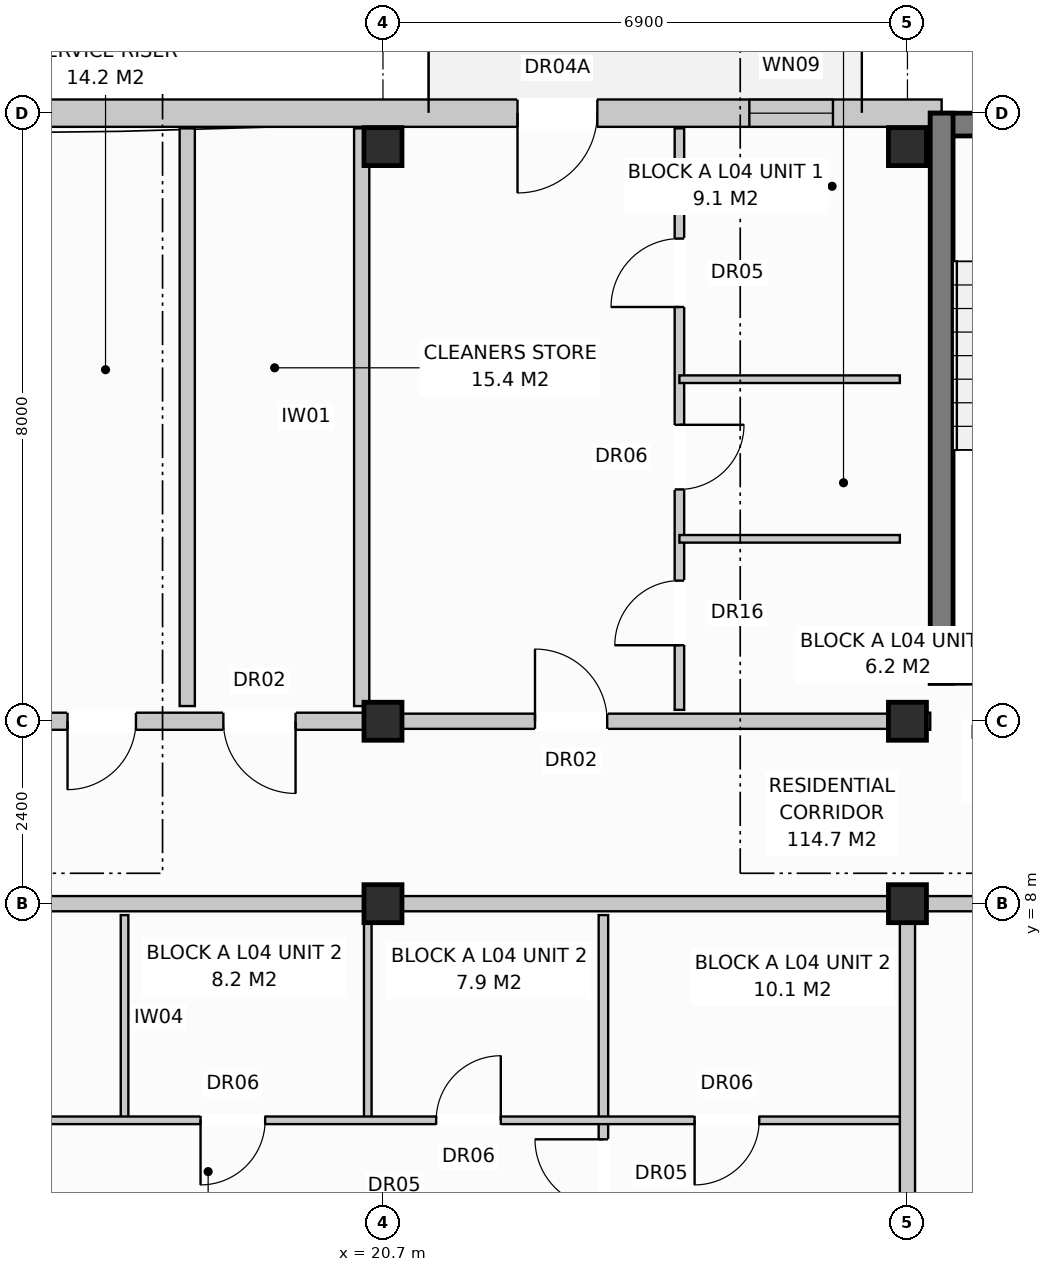
"""IFC4 building model, lengths in metres.
Left out: names, types, materials, properties, quantities, classifications, styles, units other than length and angle.
Written with IfcOpenShell. Run it as: python <this file> out.ifc"""

import sys

from ifc_helpers import new_model, si_unit, direction, frame, frame_2d, origin, origin_with_axes, origin_2d, place, context, subcontext, project, spatial, rectangle, extrude, element, fill, save


model = new_model("IFC4")
c1 = context("Model", 3, precision=1e-05, world=origin(), true_north=direction((0.0, 1.0)))
c2 = subcontext(c1, "Body", "Model", "MODEL_VIEW")
j1 = project(units=[si_unit("LENGTHUNIT", "METRE"), si_unit("PLANEANGLEUNIT", "RADIAN")], contexts=[c1])
p1 = place(None, origin())
s1 = spatial("IfcSite", under=j1, at=p1, CompositionType="ELEMENT")
p2 = place(p1, origin())
s2 = spatial("IfcBuilding", under=s1, at=p2, CompositionType="ELEMENT")
p3 = place(p2, frame((0.0, 0.0, 14.4)))
s3 = spatial("IfcBuildingStorey", under=s2, at=p3, CompositionType="ELEMENT", Elevation=14.4)
for number, where, z_axis, x_axis in (
    (1, (20.7, 8.0, 0.0), (0.0, 0.0, 1.0), (1.0, 0.0, 0.0)),
    (2, (20.7, 10.4, 0.0), (0.0, 0.0, 1.0), (1.0, 0.0, 0.0)),
    (3, (20.7, 17.96, 0.0), (0.0, 0.0, 1.0), (1.0, 0.0, 0.0)),
    (4, (27.6, 8.0, 0.0), (0.0, 0.0, 1.0), (1.0, 0.0, 0.0)),
    (5, (27.6, 10.4, 0.0), (0.0, 0.0, 1.0), (1.0, 0.0, 0.0)),
    (6, (27.6, 17.96, 0.0), (0.0, 0.0, 1.0), (1.0, 0.0, 0.0)),
):
    element("IfcColumn", number, at=place(p3, frame(where, z_axis=z_axis, x_axis=x_axis)), inside=s3, PredefinedType="COLUMN", context=c2, shape_type="SweptSolid", body=[
        extrude(rectangle(XDim=0.5, YDim=0.5, at=origin_2d()), origin(), (0.0, 0.0, 1.0), 3.2),
    ])
p4 = place(p3, frame((10.65, 18.4, 0.0), z_axis=(0.0, 0.0, 1.0), x_axis=(1.0, 0.0, 0.0)))
e7 = element("IfcWall", 7, at=p4, inside=s3, PredefinedType="STANDARD", context=c2, shape_type="SweptSolid", body=[
    extrude(rectangle(XDim=17.4, YDim=0.36, at=frame_2d((8.7, 0.0))), origin(), (0.0, 0.0, 1.0), 2.94),
])
p5 = place(p4, frame((11.82, 0.0, 0.0)))
e8 = element("IfcOpeningElement", 8, at=p5, cuts=e7, PredefinedType="OPENING", context=c2, shape_type="SweptSolid", body=[
    extrude(rectangle(XDim=1.05, YDim=2.12, at=frame_2d((0.525, 1.06))), frame((0.0, 0.192, 0.0), z_axis=(0.0, -1.0, 0.0), x_axis=(1.0, 0.0, 0.0)), (0.0, 0.0, 1.0), 0.384),
])
p6 = place(p4, frame((14.87, 0.0, 0.72)))
e9 = element("IfcOpeningElement", 9, at=p6, cuts=e7, PredefinedType="OPENING", context=c2, shape_type="SweptSolid", body=[
    extrude(rectangle(XDim=1.1, YDim=1.5, at=frame_2d((0.55, 0.75))), frame((0.0, 0.192, 0.0), z_axis=(0.0, -1.0, 0.0), x_axis=(1.0, 0.0, 0.0)), (0.0, 0.0, 1.0), 0.384),
])
for number, where, z_axis, x_axis in (
    (10, (18.125, 10.6, 0.0), (0.0, 0.0, 1.0), (0.0, 1.0, 0.0)),
    (11, (20.42, 10.6, 0.0), (0.0, 0.0, 1.0), (0.0, 1.0, 0.0)),
):
    element("IfcWall", number, at=place(p3, frame(where, z_axis=z_axis, x_axis=x_axis)), inside=s3, PredefinedType="PARTITIONING", context=c2, shape_type="SweptSolid", body=[
        extrude(rectangle(XDim=7.6, YDim=0.2, at=frame_2d((3.8, 0.0))), origin(), (0.0, 0.0, 1.0), 2.94),
    ])
p7 = place(p3, frame((10.8, 10.4, 0.0), z_axis=(0.0, 0.0, 1.0), x_axis=(1.0, 0.0, 0.0)))
e12 = element("IfcWall", 12, at=p7, inside=s3, PredefinedType="PARTITIONING", context=c2, shape_type="SweptSolid", body=[
    extrude(rectangle(XDim=9.9, YDim=0.225, at=frame_2d((4.95, 0.0))), origin(), (0.0, 0.0, 1.0), 2.38),
])
p8 = place(p7, frame((0.475, 0.0, 0.0)))
e13 = element("IfcOpeningElement", 13, at=p8, cuts=e12, PredefinedType="OPENING", context=c2, shape_type="SweptSolid", body=[
    extrude(rectangle(XDim=1.1, YDim=2.15, at=frame_2d((0.55, 1.075))), frame((0.0, 0.125, 0.0), z_axis=(0.0, -1.0, 0.0), x_axis=(1.0, 0.0, 0.0)), (0.0, 0.0, 1.0), 0.249),
])
p9 = place(p7, frame((5.75, 0.0, 0.0)))
e14 = element("IfcOpeningElement", 14, at=p9, cuts=e12, PredefinedType="OPENING", context=c2, shape_type="SweptSolid", body=[
    extrude(rectangle(XDim=0.9, YDim=2.1, at=frame_2d((0.45, 1.05))), frame((0.0, 0.125, 0.0), z_axis=(0.0, -1.0, 0.0), x_axis=(1.0, 0.0, 0.0)), (0.0, 0.0, 1.0), 0.249),
])
p10 = place(p7, frame((7.8, 0.0, 0.0)))
e15 = element("IfcOpeningElement", 15, at=p10, cuts=e12, PredefinedType="OPENING", context=c2, shape_type="SweptSolid", body=[
    extrude(rectangle(XDim=0.95, YDim=2.15, at=frame_2d((0.475, 1.075))), frame((0.0, 0.125, 0.0), z_axis=(0.0, -1.0, 0.0), x_axis=(1.0, 0.0, 0.0)), (0.0, 0.0, 1.0), 0.249),
])
for number, where, z_axis, x_axis in (
    (16, (27.9, 18.25, 0.0), (0.0, 0.0, 1.0), (1.0, 0.0, 0.0)),
    (17, (27.9, 11.05, 0.0), (0.0, 0.0, 1.0), (1.0, 0.0, 0.0)),
):
    element("IfcWall", number, at=place(p3, frame(where, z_axis=z_axis, x_axis=x_axis)), inside=s3, PredefinedType="SHEAR", context=c2, shape_type="SweptSolid", body=[
        extrude(rectangle(XDim=3.6, YDim=0.3, at=frame_2d((1.8, 0.0))), origin(), (0.0, 0.0, 1.0), 2.94),
    ])
p11 = place(p3, frame((28.05, 10.9, 0.0), z_axis=(0.0, 0.0, 1.0), x_axis=(0.0, 1.0, 0.0)))
e18 = element("IfcWall", 18, at=p11, inside=s3, PredefinedType="SHEAR", context=c2, shape_type="SweptSolid", body=[
    extrude(rectangle(XDim=7.5, YDim=0.3, at=frame_2d((3.75, 0.0))), origin(), (0.0, 0.0, 1.0), 2.94),
])
p12 = place(p3, frame((27.6, 10.4, 0.0), z_axis=(0.0, 0.0, 1.0), x_axis=(1.0, 0.0, 0.0)))
e19 = element("IfcWall", 19, at=p12, inside=s3, PredefinedType="PARTITIONING", context=c2, shape_type="SweptSolid", body=[
    extrude(rectangle(XDim=0.3, YDim=0.225, at=frame_2d((0.15, 0.0))), origin(), (0.0, 0.0, 1.0), 2.94),
])
p13 = place(p3, frame((27.6, 7.85, 0.0), z_axis=(0.0, 0.0, 1.0), x_axis=(0.0, -1.0, 0.0)))
e20 = element("IfcWall", 20, at=p13, inside=s3, PredefinedType="PARTITIONING", context=c2, shape_type="SweptSolid", body=[
    extrude(rectangle(XDim=7.7, YDim=0.2, at=frame_2d((3.85, 0.0))), origin(), (0.0, 0.0, 1.0), 2.94),
])
p14 = place(p3, frame((6.9, 8.0, 0.0), z_axis=(0.0, 0.0, 1.0), x_axis=(1.0, 0.0, 0.0)))
e21 = element("IfcWall", 21, at=p14, inside=s3, PredefinedType="PARTITIONING", context=c2, shape_type="SweptSolid", body=[
    extrude(rectangle(XDim=20.7, YDim=0.2, at=frame_2d((10.35, 0.0))), origin(), (0.0, 0.0, 1.0), 2.38),
])
p15 = place(p14, frame((2.4, 0.0, 0.0)))
e22 = element("IfcOpeningElement", 22, at=p15, cuts=e21, PredefinedType="OPENING", context=c2, shape_type="SweptSolid", body=[
    extrude(rectangle(XDim=0.95, YDim=2.15, at=frame_2d((0.475, 1.075))), frame((0.0, 0.112, 0.0), z_axis=(0.0, -1.0, 0.0), x_axis=(1.0, 0.0, 0.0)), (0.0, 0.0, 1.0), 0.224),
])
for number, where, z_axis, x_axis in (
    (23, (17.3, 7.85, 0.0), (0.0, 0.0, 1.0), (0.0, -1.0, 0.0)),
    (24, (20.5, 7.85, 0.0), (0.0, 0.0, 1.0), (0.0, -1.0, 0.0)),
):
    element("IfcWall", number, at=place(p3, frame(where, z_axis=z_axis, x_axis=x_axis)), inside=s3, PredefinedType="PARTITIONING", context=c2, shape_type="SweptSolid", body=[
        extrude(rectangle(XDim=2.7, YDim=0.1, at=frame_2d((1.35, 0.0))), origin(), (0.0, 0.0, 1.0), 2.94),
    ])
p16 = place(p3, frame((23.6, 7.85, 0.0), z_axis=(0.0, 0.0, 1.0), x_axis=(0.0, -1.0, 0.0)))
e25 = element("IfcWall", 25, at=p16, inside=s3, PredefinedType="PARTITIONING", context=c2, shape_type="SweptSolid", body=[
    extrude(rectangle(XDim=7.65, YDim=0.125, at=frame_2d((3.825, 0.0))), origin(), (0.0, 0.0, 1.0), 2.94),
])
p17 = place(p16, frame((2.95, 0.0, 0.0)))
e26 = element("IfcOpeningElement", 26, at=p17, cuts=e25, PredefinedType="OPENING", context=c2, shape_type="SweptSolid", body=[
    extrude(rectangle(XDim=0.9, YDim=2.1, at=frame_2d((0.45, 1.05))), frame((0.0, 0.074, 0.0), z_axis=(0.0, -1.0, 0.0), x_axis=(1.0, 0.0, 0.0)), (0.0, 0.0, 1.0), 0.149),
])
p18 = place(p3, frame((13.2, 5.15, 0.0), z_axis=(0.0, 0.0, 1.0), x_axis=(1.0, 0.0, 0.0)))
e27 = element("IfcWall", 27, at=p18, inside=s3, PredefinedType="PARTITIONING", context=c2, shape_type="SweptSolid", body=[
    extrude(rectangle(XDim=14.3, YDim=0.1, at=frame_2d((7.15, 0.0))), origin(), (0.0, 0.0, 1.0), 2.94),
])
p19 = place(p18, frame((1.6, 0.0, 0.0)))
e28 = element("IfcOpeningElement", 28, at=p19, cuts=e27, PredefinedType="OPENING", context=c2, shape_type="SweptSolid", body=[
    extrude(rectangle(XDim=0.9, YDim=2.1, at=frame_2d((0.45, 1.05))), frame((0.0, 0.062, 0.0), z_axis=(0.0, -1.0, 0.0), x_axis=(1.0, 0.0, 0.0)), (0.0, 0.0, 1.0), 0.124),
])
p20 = place(p18, frame((5.1, 0.0, 0.0)))
e29 = element("IfcOpeningElement", 29, at=p20, cuts=e27, PredefinedType="OPENING", context=c2, shape_type="SweptSolid", body=[
    extrude(rectangle(XDim=0.85, YDim=2.05, at=frame_2d((0.425, 1.025))), frame((0.0, 0.062, 0.0), z_axis=(0.0, -1.0, 0.0), x_axis=(1.0, 0.0, 0.0)), (0.0, 0.0, 1.0), 0.124),
])
p21 = place(p18, frame((8.2, 0.0, 0.0)))
e30 = element("IfcOpeningElement", 30, at=p21, cuts=e27, PredefinedType="OPENING", context=c2, shape_type="SweptSolid", body=[
    extrude(rectangle(XDim=0.85, YDim=2.05, at=frame_2d((0.425, 1.025))), frame((0.0, 0.062, 0.0), z_axis=(0.0, -1.0, 0.0), x_axis=(1.0, 0.0, 0.0)), (0.0, 0.0, 1.0), 0.124),
])
p22 = place(p18, frame((11.6, 0.0, 0.0)))
e31 = element("IfcOpeningElement", 31, at=p22, cuts=e27, PredefinedType="OPENING", context=c2, shape_type="SweptSolid", body=[
    extrude(rectangle(XDim=0.85, YDim=2.05, at=frame_2d((0.425, 1.025))), frame((0.0, 0.062, 0.0), z_axis=(0.0, -1.0, 0.0), x_axis=(1.0, 0.0, 0.0)), (0.0, 0.0, 1.0), 0.124),
])
p23 = place(p3, frame((27.6, 8.0, 0.0), z_axis=(0.0, 0.0, 1.0), x_axis=(1.0, 0.0, 0.0)))
e32 = element("IfcWall", 32, at=p23, inside=s3, PredefinedType="PARTITIONING", context=c2, shape_type="SweptSolid", body=[
    extrude(rectangle(XDim=6.9, YDim=0.2, at=frame_2d((3.45, 0.0))), origin(), (0.0, 0.0, 1.0), 2.38),
])
p24 = place(p23, frame((2.0, 0.0, 0.0)))
e33 = element("IfcOpeningElement", 33, at=p24, cuts=e32, PredefinedType="OPENING", context=c2, shape_type="SweptSolid", body=[
    extrude(rectangle(XDim=0.95, YDim=2.15, at=frame_2d((0.475, 1.075))), frame((0.0, 0.112, 0.0), z_axis=(0.0, -1.0, 0.0), x_axis=(1.0, 0.0, 0.0)), (0.0, 0.0, 1.0), 0.224),
])
p25 = place(p3, frame((20.7, 10.4, 0.0), z_axis=(0.0, 0.0, 1.0), x_axis=(1.0, 0.0, 0.0)))
e34 = element("IfcWall", 34, at=p25, inside=s3, PredefinedType="PARTITIONING", context=c2, shape_type="SweptSolid", body=[
    extrude(rectangle(XDim=6.9, YDim=0.2, at=frame_2d((3.45, 0.0))), origin(), (0.0, 0.0, 1.0), 2.38),
])
p26 = place(p25, frame((2.0, 0.0, 0.0)))
e35 = element("IfcOpeningElement", 35, at=p26, cuts=e34, PredefinedType="OPENING", context=c2, shape_type="SweptSolid", body=[
    extrude(rectangle(XDim=0.95, YDim=2.15, at=frame_2d((0.475, 1.075))), frame((0.0, 0.112, 0.0), z_axis=(0.0, -1.0, 0.0), x_axis=(1.0, 0.0, 0.0)), (0.0, 0.0, 1.0), 0.224),
])
p27 = place(p3, frame((24.6, 10.55, 0.0), z_axis=(0.0, 0.0, 1.0), x_axis=(0.0, 1.0, 0.0)))
e36 = element("IfcWall", 36, at=p27, inside=s3, PredefinedType="PARTITIONING", context=c2, shape_type="SweptSolid", body=[
    extrude(rectangle(XDim=7.65, YDim=0.125, at=frame_2d((3.825, 0.0))), origin(), (0.0, 0.0, 1.0), 2.94),
])
p28 = place(p27, frame((0.85, 0.0, 0.0)))
e37 = element("IfcOpeningElement", 37, at=p28, cuts=e36, PredefinedType="OPENING", context=c2, shape_type="SweptSolid", body=[
    extrude(rectangle(XDim=0.85, YDim=2.1, at=frame_2d((0.425, 1.05))), frame((0.0, 0.074, 0.0), z_axis=(0.0, -1.0, 0.0), x_axis=(1.0, 0.0, 0.0)), (0.0, 0.0, 1.0), 0.149),
])
p29 = place(p27, frame((2.9, 0.0, 0.0)))
e38 = element("IfcOpeningElement", 38, at=p29, cuts=e36, PredefinedType="OPENING", context=c2, shape_type="SweptSolid", body=[
    extrude(rectangle(XDim=0.85, YDim=2.05, at=frame_2d((0.425, 1.025))), frame((0.0, 0.074, 0.0), z_axis=(0.0, -1.0, 0.0), x_axis=(1.0, 0.0, 0.0)), (0.0, 0.0, 1.0), 0.149),
])
p30 = place(p27, frame((5.3, 0.0, 0.0)))
e39 = element("IfcOpeningElement", 39, at=p30, cuts=e36, PredefinedType="OPENING", context=c2, shape_type="SweptSolid", body=[
    extrude(rectangle(XDim=0.9, YDim=2.1, at=frame_2d((0.45, 1.05))), frame((0.0, 0.074, 0.0), z_axis=(0.0, -1.0, 0.0), x_axis=(1.0, 0.0, 0.0)), (0.0, 0.0, 1.0), 0.149),
])
for number, where, z_axis, x_axis in (
    (40, (24.6, 12.8, 0.0), (0.0, 0.0, 1.0), (1.0, 0.0, 0.0)),
    (41, (24.6, 14.9, 0.0), (0.0, 0.0, 1.0), (1.0, 0.0, 0.0)),
):
    element("IfcWall", number, at=place(p3, frame(where, z_axis=z_axis, x_axis=x_axis)), inside=s3, PredefinedType="PARTITIONING", context=c2, shape_type="SweptSolid", body=[
        extrude(rectangle(XDim=2.9, YDim=0.1, at=frame_2d((1.45, 0.0))), origin(), (0.0, 0.0, 1.0), 2.94),
    ])
p31 = place(p5, frame((1.05, 0.0, 0.0), z_axis=(0.0, 0.0, 1.0), x_axis=(-1.0, 0.0, 0.0)))
e42 = element("IfcDoor", 42, at=p31, inside=s3, OperationType="SINGLE_SWING_LEFT", PredefinedType="DOOR", context=c2, shape_type="SweptSolid", body=[
    extrude(rectangle(XDim=1.05, YDim=2.12, at=frame_2d((0.525, 1.06))), frame((0.0, 0.025, 0.0), z_axis=(0.0, -1.0, 0.0), x_axis=(1.0, 0.0, 0.0)), (0.0, 0.0, 1.0), 0.05),
])
fill(e8, e42)
p32 = place(p6, origin_with_axes())
e43 = element("IfcWindow", 43, at=p32, inside=s3, PartitioningType="SINGLE_PANEL", PredefinedType="WINDOW", context=c2, shape_type="SweptSolid", body=[
    extrude(rectangle(XDim=1.1, YDim=1.5, at=frame_2d((0.55, 0.75))), frame((0.0, 0.03, 0.0), z_axis=(0.0, -1.0, 0.0), x_axis=(1.0, 0.0, 0.0)), (0.0, 0.0, 1.0), 0.06),
])
fill(e9, e43)
p33 = place(p9, frame((0.9, 0.0, 0.0), z_axis=(0.0, 0.0, 1.0), x_axis=(-1.0, 0.0, 0.0)))
e44 = element("IfcDoor", 44, at=p33, inside=s3, OperationType="SINGLE_SWING_LEFT", PredefinedType="DOOR", context=c2, shape_type="SweptSolid", body=[
    extrude(rectangle(XDim=0.9, YDim=2.1, at=frame_2d((0.45, 1.05))), frame((0.0, 0.025, 0.0), z_axis=(0.0, -1.0, 0.0), x_axis=(1.0, 0.0, 0.0)), (0.0, 0.0, 1.0), 0.05),
])
fill(e14, e44)
p34 = place(p10, frame((0.95, 0.0, 0.0), z_axis=(0.0, 0.0, 1.0), x_axis=(-1.0, 0.0, 0.0)))
e45 = element("IfcDoor", 45, at=p34, inside=s3, OperationType="SINGLE_SWING_RIGHT", PredefinedType="DOOR", context=c2, shape_type="SweptSolid", body=[
    extrude(rectangle(XDim=0.95, YDim=2.15, at=frame_2d((0.475, 1.075))), frame((0.0, 0.025, 0.0), z_axis=(0.0, -1.0, 0.0), x_axis=(1.0, 0.0, 0.0)), (0.0, 0.0, 1.0), 0.05),
])
fill(e15, e45)
p35 = place(p17, frame((0.9, 0.0, 0.0), z_axis=(0.0, 0.0, 1.0), x_axis=(-1.0, 0.0, 0.0)))
e46 = element("IfcDoor", 46, at=p35, inside=s3, OperationType="SINGLE_SWING_LEFT", PredefinedType="DOOR", context=c2, shape_type="SweptSolid", body=[
    extrude(rectangle(XDim=0.9, YDim=2.1, at=frame_2d((0.45, 1.05))), frame((0.0, 0.025, 0.0), z_axis=(0.0, -1.0, 0.0), x_axis=(1.0, 0.0, 0.0)), (0.0, 0.0, 1.0), 0.05),
])
fill(e26, e46)
p36 = place(p20, frame((0.85, 0.0, 0.0), z_axis=(0.0, 0.0, 1.0), x_axis=(-1.0, 0.0, 0.0)))
e47 = element("IfcDoor", 47, at=p36, inside=s3, OperationType="SINGLE_SWING_LEFT", PredefinedType="DOOR", context=c2, shape_type="SweptSolid", body=[
    extrude(rectangle(XDim=0.85, YDim=2.05, at=frame_2d((0.425, 1.025))), frame((0.0, 0.025, 0.0), z_axis=(0.0, -1.0, 0.0), x_axis=(1.0, 0.0, 0.0)), (0.0, 0.0, 1.0), 0.05),
])
fill(e29, e47)
p37 = place(p21, origin_with_axes())
e48 = element("IfcDoor", 48, at=p37, inside=s3, OperationType="SINGLE_SWING_RIGHT", PredefinedType="DOOR", context=c2, shape_type="SweptSolid", body=[
    extrude(rectangle(XDim=0.85, YDim=2.05, at=frame_2d((0.425, 1.025))), frame((0.0, 0.025, 0.0), z_axis=(0.0, -1.0, 0.0), x_axis=(1.0, 0.0, 0.0)), (0.0, 0.0, 1.0), 0.05),
])
fill(e30, e48)
p38 = place(p22, frame((0.85, 0.0, 0.0), z_axis=(0.0, 0.0, 1.0), x_axis=(-1.0, 0.0, 0.0)))
e49 = element("IfcDoor", 49, at=p38, inside=s3, OperationType="SINGLE_SWING_LEFT", PredefinedType="DOOR", context=c2, shape_type="SweptSolid", body=[
    extrude(rectangle(XDim=0.85, YDim=2.05, at=frame_2d((0.425, 1.025))), frame((0.0, 0.025, 0.0), z_axis=(0.0, -1.0, 0.0), x_axis=(1.0, 0.0, 0.0)), (0.0, 0.0, 1.0), 0.05),
])
fill(e31, e49)
p39 = place(p26, origin_with_axes())
e50 = element("IfcDoor", 50, at=p39, inside=s3, OperationType="SINGLE_SWING_LEFT", PredefinedType="DOOR", context=c2, shape_type="SweptSolid", body=[
    extrude(rectangle(XDim=0.95, YDim=2.15, at=frame_2d((0.475, 1.075))), frame((0.0, 0.025, 0.0), z_axis=(0.0, -1.0, 0.0), x_axis=(1.0, 0.0, 0.0)), (0.0, 0.0, 1.0), 0.05),
])
fill(e35, e50)
p40 = place(p28, origin_with_axes())
e51 = element("IfcDoor", 51, at=p40, inside=s3, OperationType="SINGLE_SWING_LEFT", PredefinedType="DOOR", context=c2, shape_type="SweptSolid", body=[
    extrude(rectangle(XDim=0.85, YDim=2.1, at=frame_2d((0.425, 1.05))), frame((0.0, 0.025, 0.0), z_axis=(0.0, -1.0, 0.0), x_axis=(1.0, 0.0, 0.0)), (0.0, 0.0, 1.0), 0.05),
])
fill(e37, e51)
p41 = place(p29, frame((0.85, 0.0, 0.0), z_axis=(0.0, 0.0, 1.0), x_axis=(-1.0, 0.0, 0.0)))
e52 = element("IfcDoor", 52, at=p41, inside=s3, OperationType="SINGLE_SWING_RIGHT", PredefinedType="DOOR", context=c2, shape_type="SweptSolid", body=[
    extrude(rectangle(XDim=0.85, YDim=2.05, at=frame_2d((0.425, 1.025))), frame((0.0, 0.025, 0.0), z_axis=(0.0, -1.0, 0.0), x_axis=(1.0, 0.0, 0.0)), (0.0, 0.0, 1.0), 0.05),
])
fill(e38, e52)
p42 = place(p30, origin_with_axes())
e53 = element("IfcDoor", 53, at=p42, inside=s3, OperationType="SINGLE_SWING_LEFT", PredefinedType="DOOR", context=c2, shape_type="SweptSolid", body=[
    extrude(rectangle(XDim=0.9, YDim=2.1, at=frame_2d((0.45, 1.05))), frame((0.0, 0.025, 0.0), z_axis=(0.0, -1.0, 0.0), x_axis=(1.0, 0.0, 0.0)), (0.0, 0.0, 1.0), 0.05),
])
fill(e39, e53)
save(model, sys.argv[1])
